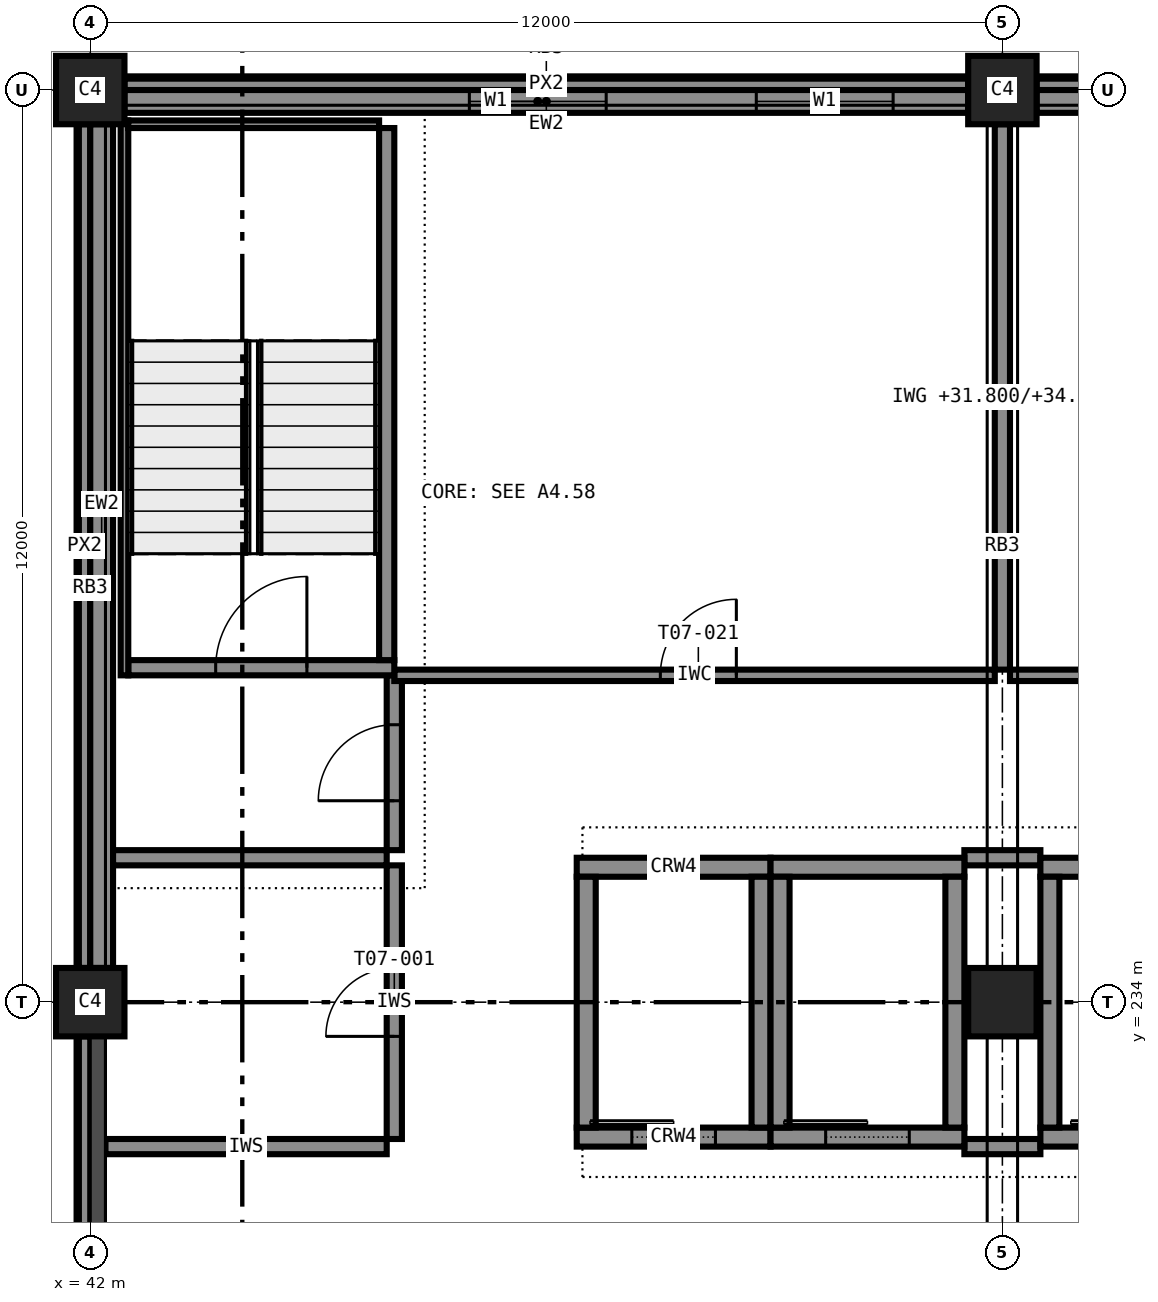
"""IFC4 building model, lengths in metres.
Left out: names, types, materials, properties, quantities, classifications, styles, units other than length and angle.
Written with IfcOpenShell. Run it as: python <this file> out.ifc"""

import sys

from ifc_helpers import new_model, si_unit, direction, frame, frame_2d, origin, origin_2d, place, context, subcontext, project, spatial, rectangle, extrude, element, fill, save


model = new_model("IFC4")
c1 = context("Model", 3, precision=1e-05, world=origin(), true_north=direction((0.0, 1.0)))
c2 = subcontext(c1, "Body", "Model", "MODEL_VIEW")
j1 = project(units=[si_unit("LENGTHUNIT", "METRE"), si_unit("PLANEANGLEUNIT", "RADIAN")], contexts=[c1])
p1 = place(None, origin())
s1 = spatial("IfcSite", under=j1, at=p1, CompositionType="ELEMENT")
p2 = place(p1, origin())
s2 = spatial("IfcBuilding", under=s1, at=p2, CompositionType="ELEMENT")
p3 = place(p2, frame((0.0, 0.0, 31.8)))
s3 = spatial("IfcBuildingStorey", under=s2, at=p3, CompositionType="ELEMENT", Elevation=31.8)
for number, where, z_axis, x_axis in (
    (1, (42.0, 234.0, 0.0), (0.0, 0.0, 1.0), (1.0, 0.0, 0.0)),
    (2, (42.0, 246.0, 0.0), (0.0, 0.0, 1.0), (1.0, 0.0, 0.0)),
    (3, (54.0, 234.0, 0.0), (0.0, 0.0, 1.0), (1.0, 0.0, 0.0)),
    (4, (54.0, 246.0, 0.0), (0.0, 0.0, 1.0), (1.0, 0.0, 0.0)),
):
    element("IfcColumn", number, at=place(p3, frame(where, z_axis=z_axis, x_axis=x_axis)), inside=s3, PredefinedType="COLUMN", context=c2, shape_type="SweptSolid", body=[
        extrude(rectangle(XDim=0.9, YDim=0.9, at=origin_2d()), origin(), (0.0, 0.0, 1.0), 3.6),
    ])
p4 = place(p3, frame((54.5, 232.225, 0.0), z_axis=(0.0, 0.0, 1.0), x_axis=(1.0, 0.0, 0.0)))
e5 = element("IfcWall", 5, at=p4, inside=s3, PredefinedType="SHEAR", context=c2, shape_type="SweptSolid", body=[
    extrude(rectangle(XDim=3.0, YDim=0.25, at=frame_2d((1.5, 0.0))), origin(), (0.0, 0.0, 1.0), 3.6),
])
p5 = place(p4, frame((0.95, 0.0, 0.0)))
e6 = element("IfcOpeningElement", 6, at=p5, cuts=e5, PredefinedType="OPENING", context=c2, shape_type="SweptSolid", body=[
    extrude(rectangle(XDim=1.1, YDim=2.1, at=frame_2d((0.55, 1.05))), frame((0.0, 0.135, 0.0), z_axis=(0.0, -1.0, 0.0), x_axis=(1.0, 0.0, 0.0)), (0.0, 0.0, 1.0), 0.27),
])
p6 = place(p3, frame((54.5, 235.775, 0.0), z_axis=(0.0, 0.0, 1.0), x_axis=(1.0, 0.0, 0.0)))
e7 = element("IfcWall", 7, at=p6, inside=s3, PredefinedType="SHEAR", context=c2, shape_type="SweptSolid", body=[
    extrude(rectangle(XDim=3.0, YDim=0.25, at=frame_2d((1.5, 0.0))), origin(), (0.0, 0.0, 1.0), 3.6),
])
p7 = place(p3, frame((54.625, 232.35, 0.0), z_axis=(0.0, 0.0, 1.0), x_axis=(0.0, 1.0, 0.0)))
e8 = element("IfcWall", 8, at=p7, inside=s3, PredefinedType="SHEAR", context=c2, shape_type="SweptSolid", body=[
    extrude(rectangle(XDim=3.3, YDim=0.25, at=frame_2d((1.65, 0.0))), origin(), (0.0, 0.0, 1.0), 3.6),
])
p8 = place(p3, frame((48.4, 232.225, 0.0), z_axis=(0.0, 0.0, 1.0), x_axis=(1.0, 0.0, 0.0)))
e9 = element("IfcWall", 9, at=p8, inside=s3, PredefinedType="SHEAR", context=c2, shape_type="SweptSolid", body=[
    extrude(rectangle(XDim=2.55, YDim=0.25, at=frame_2d((1.275, 0.0))), origin(), (0.0, 0.0, 1.0), 3.6),
])
p9 = place(p8, frame((0.725, 0.0, 0.0)))
e10 = element("IfcOpeningElement", 10, at=p9, cuts=e9, PredefinedType="OPENING", context=c2, shape_type="SweptSolid", body=[
    extrude(rectangle(XDim=1.1, YDim=2.1, at=frame_2d((0.55, 1.05))), frame((0.0, 0.135, 0.0), z_axis=(0.0, -1.0, 0.0), x_axis=(1.0, 0.0, 0.0)), (0.0, 0.0, 1.0), 0.27),
])
p10 = place(p3, frame((48.4, 235.775, 0.0), z_axis=(0.0, 0.0, 1.0), x_axis=(1.0, 0.0, 0.0)))
e11 = element("IfcWall", 11, at=p10, inside=s3, PredefinedType="SHEAR", context=c2, shape_type="SweptSolid", body=[
    extrude(rectangle(XDim=2.55, YDim=0.25, at=frame_2d((1.275, 0.0))), origin(), (0.0, 0.0, 1.0), 3.6),
])
for number, where, z_axis, x_axis in (
    (12, (48.525, 232.35, 0.0), (0.0, 0.0, 1.0), (0.0, 1.0, 0.0)),
    (13, (50.825, 232.35, 0.0), (0.0, 0.0, 1.0), (0.0, 1.0, 0.0)),
):
    element("IfcWall", number, at=place(p3, frame(where, z_axis=z_axis, x_axis=x_axis)), inside=s3, PredefinedType="SHEAR", context=c2, shape_type="SweptSolid", body=[
        extrude(rectangle(XDim=3.3, YDim=0.25, at=frame_2d((1.65, 0.0))), origin(), (0.0, 0.0, 1.0), 3.6),
    ])
p11 = place(p3, frame((50.95, 232.225, 0.0), z_axis=(0.0, 0.0, 1.0), x_axis=(1.0, 0.0, 0.0)))
e14 = element("IfcWall", 14, at=p11, inside=s3, PredefinedType="SHEAR", context=c2, shape_type="SweptSolid", body=[
    extrude(rectangle(XDim=2.55, YDim=0.25, at=frame_2d((1.275, 0.0))), origin(), (0.0, 0.0, 1.0), 3.6),
])
p12 = place(p11, frame((0.725, 0.0, 0.0)))
e15 = element("IfcOpeningElement", 15, at=p12, cuts=e14, PredefinedType="OPENING", context=c2, shape_type="SweptSolid", body=[
    extrude(rectangle(XDim=1.1, YDim=2.1, at=frame_2d((0.55, 1.05))), frame((0.0, 0.135, 0.0), z_axis=(0.0, -1.0, 0.0), x_axis=(1.0, 0.0, 0.0)), (0.0, 0.0, 1.0), 0.27),
])
p13 = place(p3, frame((50.95, 235.775, 0.0), z_axis=(0.0, 0.0, 1.0), x_axis=(1.0, 0.0, 0.0)))
e16 = element("IfcWall", 16, at=p13, inside=s3, PredefinedType="SHEAR", context=c2, shape_type="SweptSolid", body=[
    extrude(rectangle(XDim=2.55, YDim=0.25, at=frame_2d((1.275, 0.0))), origin(), (0.0, 0.0, 1.0), 3.6),
])
for number, where, z_axis, x_axis in (
    (17, (51.075, 232.35, 0.0), (0.0, 0.0, 1.0), (0.0, 1.0, 0.0)),
    (18, (53.375, 232.35, 0.0), (0.0, 0.0, 1.0), (0.0, 1.0, 0.0)),
):
    element("IfcWall", number, at=place(p3, frame(where, z_axis=z_axis, x_axis=x_axis)), inside=s3, PredefinedType="SHEAR", context=c2, shape_type="SweptSolid", body=[
        extrude(rectangle(XDim=3.3, YDim=0.25, at=frame_2d((1.65, 0.0))), origin(), (0.0, 0.0, 1.0), 3.6),
    ])
p14 = place(p3, frame((42.5, 238.4, 0.0), z_axis=(0.0, 0.0, 1.0), x_axis=(1.0, 0.0, 0.0)))
e19 = element("IfcWall", 19, at=p14, inside=s3, PredefinedType="SHEAR", context=c2, shape_type="SweptSolid", body=[
    extrude(rectangle(XDim=3.5, YDim=0.2, at=frame_2d((1.75, 0.0))), origin(), (0.0, 0.0, 1.0), 3.6),
])
p15 = place(p14, frame((1.15, 0.0, 0.0)))
e20 = element("IfcOpeningElement", 20, at=p15, cuts=e19, PredefinedType="OPENING", context=c2, shape_type="SweptSolid", body=[
    extrude(rectangle(XDim=1.2, YDim=2.1, at=frame_2d((0.6, 1.05))), frame((0.0, 0.11, 0.0), z_axis=(0.0, -1.0, 0.0), x_axis=(1.0, 0.0, 0.0)), (0.0, 0.0, 1.0), 0.22),
])
p16 = place(p3, frame((45.9, 238.5, 0.0), z_axis=(0.0, 0.0, 1.0), x_axis=(0.0, 1.0, 0.0)))
e21 = element("IfcWall", 21, at=p16, inside=s3, PredefinedType="SHEAR", context=c2, shape_type="SweptSolid", body=[
    extrude(rectangle(XDim=7.0, YDim=0.2, at=frame_2d((3.5, 0.0))), origin(), (0.0, 0.0, 1.0), 3.6),
])
p17 = place(p3, frame((42.45, 238.3, 0.0), z_axis=(0.0, 0.0, 1.0), x_axis=(0.0, 1.0, 0.0)))
e22 = element("IfcWall", 22, at=p17, inside=s3, PredefinedType="SHEAR", context=c2, shape_type="SweptSolid", body=[
    extrude(rectangle(XDim=7.3, YDim=0.1, at=frame_2d((3.65, 0.0))), origin(), (0.0, 0.0, 1.0), 3.4),
])
p18 = place(p3, frame((42.5, 245.55, 0.0), z_axis=(0.0, 0.0, 1.0), x_axis=(1.0, 0.0, 0.0)))
e23 = element("IfcWall", 23, at=p18, inside=s3, PredefinedType="SHEAR", context=c2, shape_type="SweptSolid", body=[
    extrude(rectangle(XDim=3.3, YDim=0.1, at=frame_2d((1.65, 0.0))), origin(), (0.0, 0.0, 1.0), 3.4),
])
p19 = place(p3, frame((65.55, 245.85, 0.0), z_axis=(0.0, 0.0, 1.0), x_axis=(-1.0, 0.0, 0.0)))
e24 = element("IfcWall", 24, at=p19, inside=s3, PredefinedType="STANDARD", context=c2, shape_type="SweptSolid", body=[
    extrude(rectangle(XDim=11.1, YDim=0.3, at=frame_2d((5.55, 0.0))), origin(), (0.0, 0.0, 1.0), 2.6),
])
p20 = place(p19, frame((7.425, 0.0, 0.85)))
e25 = element("IfcOpeningElement", 25, at=p20, cuts=e24, PredefinedType="OPENING", context=c2, shape_type="SweptSolid", body=[
    extrude(rectangle(XDim=1.8, YDim=1.75, at=frame_2d((0.9, 0.875))), frame((0.0, 0.16, 0.0), z_axis=(0.0, -1.0, 0.0), x_axis=(1.0, 0.0, 0.0)), (0.0, 0.0, 1.0), 0.32),
])
p21 = place(p19, frame((1.875, 0.0, 0.85)))
e26 = element("IfcOpeningElement", 26, at=p21, cuts=e24, PredefinedType="OPENING", context=c2, shape_type="SweptSolid", body=[
    extrude(rectangle(XDim=1.8, YDim=1.75, at=frame_2d((0.9, 0.875))), frame((0.0, 0.16, 0.0), z_axis=(0.0, -1.0, 0.0), x_axis=(1.0, 0.0, 0.0)), (0.0, 0.0, 1.0), 0.32),
])
p22 = place(p3, frame((53.55, 245.85, 0.0), z_axis=(0.0, 0.0, 1.0), x_axis=(-1.0, 0.0, 0.0)))
e27 = element("IfcWall", 27, at=p22, inside=s3, PredefinedType="STANDARD", context=c2, shape_type="SweptSolid", body=[
    extrude(rectangle(XDim=11.1, YDim=0.3, at=frame_2d((5.55, 0.0))), origin(), (0.0, 0.0, 1.0), 2.6),
])
p23 = place(p22, frame((0.988, 0.0, 0.85)))
e28 = element("IfcOpeningElement", 28, at=p23, cuts=e27, PredefinedType="OPENING", context=c2, shape_type="SweptSolid", body=[
    extrude(rectangle(XDim=1.8, YDim=1.75, at=frame_2d((0.9, 0.875))), frame((0.0, 0.16, 0.0), z_axis=(0.0, -1.0, 0.0), x_axis=(1.0, 0.0, 0.0)), (0.0, 0.0, 1.0), 0.32),
])
p24 = place(p22, frame((4.762, 0.0, 0.85)))
e29 = element("IfcOpeningElement", 29, at=p24, cuts=e27, PredefinedType="OPENING", context=c2, shape_type="SweptSolid", body=[
    extrude(rectangle(XDim=1.8, YDim=1.75, at=frame_2d((0.9, 0.875))), frame((0.0, 0.16, 0.0), z_axis=(0.0, -1.0, 0.0), x_axis=(1.0, 0.0, 0.0)), (0.0, 0.0, 1.0), 0.32),
])
for number, where, z_axis, x_axis in (
    (30, (65.55, 246.075, 3.4), (0.0, 0.0, 1.0), (-1.0, 0.0, 0.0)),
    (31, (53.55, 246.075, 3.4), (0.0, 0.0, 1.0), (-1.0, 0.0, 0.0)),
):
    element("IfcWall", number, at=place(p3, frame(where, z_axis=z_axis, x_axis=x_axis)), inside=s3, PredefinedType="STANDARD", context=c2, shape_type="SweptSolid", body=[
        extrude(rectangle(XDim=11.1, YDim=0.15, at=frame_2d((5.55, 0.0))), origin(), (0.0, 0.0, 1.0), 0.2),
    ])
p25 = place(p3, frame((42.15, 245.55, 0.0), z_axis=(0.0, 0.0, 1.0), x_axis=(0.0, -1.0, 0.0)))
e32 = element("IfcWall", 32, at=p25, inside=s3, PredefinedType="STANDARD", context=c2, shape_type="SweptSolid", body=[
    extrude(rectangle(XDim=11.1, YDim=0.3, at=frame_2d((5.55, 0.0))), origin(), (0.0, 0.0, 1.0), 2.6),
])
for number, where, z_axis, x_axis in (
    (33, (41.925, 245.55, 3.4), (0.0, 0.0, 1.0), (0.0, -1.0, 0.0)),
    (34, (41.925, 233.55, 3.4), (0.0, 0.0, 1.0), (0.0, -1.0, 0.0)),
):
    element("IfcWall", number, at=place(p3, frame(where, z_axis=z_axis, x_axis=x_axis)), inside=s3, PredefinedType="STANDARD", context=c2, shape_type="SweptSolid", body=[
        extrude(rectangle(XDim=11.1, YDim=0.15, at=frame_2d((5.55, 0.0))), origin(), (0.0, 0.0, 1.0), 0.2),
    ])
p26 = place(p3, frame((42.2, 232.1, 0.0), z_axis=(0.0, 0.0, 1.0), x_axis=(1.0, 0.0, 0.0)))
e35 = element("IfcWall", 35, at=p26, inside=s3, PredefinedType="PARTITIONING", context=c2, shape_type="SweptSolid", body=[
    extrude(rectangle(XDim=3.7, YDim=0.2, at=frame_2d((1.85, 0.0))), origin(), (0.0, 0.0, 1.0), 3.4),
])
p27 = place(p3, frame((53.5, 232.1, 0.0), z_axis=(0.0, 0.0, 1.0), x_axis=(1.0, 0.0, 0.0)))
e36 = element("IfcWall", 36, at=p27, inside=s3, PredefinedType="PARTITIONING", context=c2, shape_type="SweptSolid", body=[
    extrude(rectangle(XDim=1.0, YDim=0.2, at=frame_2d((0.5, 0.0))), origin(), (0.0, 0.0, 1.0), 3.4),
])
p28 = place(p3, frame((42.3, 235.9, 0.0), z_axis=(0.0, 0.0, 1.0), x_axis=(1.0, 0.0, 0.0)))
e37 = element("IfcWall", 37, at=p28, inside=s3, PredefinedType="PARTITIONING", context=c2, shape_type="SweptSolid", body=[
    extrude(rectangle(XDim=3.6, YDim=0.2, at=frame_2d((1.8, 0.0))), origin(), (0.0, 0.0, 1.0), 3.4),
])
p29 = place(p3, frame((53.5, 235.9, 0.0), z_axis=(0.0, 0.0, 1.0), x_axis=(1.0, 0.0, 0.0)))
e38 = element("IfcWall", 38, at=p29, inside=s3, PredefinedType="PARTITIONING", context=c2, shape_type="SweptSolid", body=[
    extrude(rectangle(XDim=1.0, YDim=0.2, at=frame_2d((0.5, 0.0))), origin(), (0.0, 0.0, 1.0), 3.4),
])
p30 = place(p3, frame((46.0, 232.2, 0.0), z_axis=(0.0, 0.0, 1.0), x_axis=(0.0, 1.0, 0.0)))
e39 = element("IfcWall", 39, at=p30, inside=s3, PredefinedType="PARTITIONING", context=c2, shape_type="SweptSolid", body=[
    extrude(rectangle(XDim=3.6, YDim=0.2, at=frame_2d((1.8, 0.0))), origin(), (0.0, 0.0, 1.0), 3.4),
])
p31 = place(p30, frame((1.35, 0.0, 0.0)))
e40 = element("IfcOpeningElement", 40, at=p31, cuts=e39, PredefinedType="OPENING", context=c2, shape_type="SweptSolid", body=[
    extrude(rectangle(XDim=0.9, YDim=2.1, at=frame_2d((0.45, 1.05))), frame((0.0, 0.11, 0.0), z_axis=(0.0, -1.0, 0.0), x_axis=(1.0, 0.0, 0.0)), (0.0, 0.0, 1.0), 0.22),
])
p32 = place(p3, frame((46.0, 236.0, 0.0), z_axis=(0.0, 0.0, 1.0), x_axis=(0.0, 1.0, 0.0)))
e41 = element("IfcWall", 41, at=p32, inside=s3, PredefinedType="PARTITIONING", context=c2, shape_type="SweptSolid", body=[
    extrude(rectangle(XDim=2.3, YDim=0.2, at=frame_2d((1.15, 0.0))), origin(), (0.0, 0.0, 1.0), 3.4),
])
p33 = place(p32, frame((0.65, 0.0, 0.0)))
e42 = element("IfcOpeningElement", 42, at=p33, cuts=e41, PredefinedType="OPENING", context=c2, shape_type="SweptSolid", body=[
    extrude(rectangle(XDim=1.0, YDim=2.1, at=frame_2d((0.5, 1.05))), frame((0.0, 0.11, 0.0), z_axis=(0.0, -1.0, 0.0), x_axis=(1.0, 0.0, 0.0)), (0.0, 0.0, 1.0), 0.22),
])
p34 = place(p3, frame((46.0, 238.3, 0.0), z_axis=(0.0, 0.0, 1.0), x_axis=(1.0, 0.0, 0.0)))
e43 = element("IfcWall", 43, at=p34, inside=s3, PredefinedType="PARTITIONING", context=c2, shape_type="SweptSolid", body=[
    extrude(rectangle(XDim=7.9, YDim=0.15, at=frame_2d((3.95, 0.0))), origin(), (0.0, 0.0, 1.0), 3.4),
])
p35 = place(p34, frame((3.5, 0.0, 0.0)))
e44 = element("IfcOpeningElement", 44, at=p35, cuts=e43, PredefinedType="OPENING", context=c2, shape_type="SweptSolid", body=[
    extrude(rectangle(XDim=1.0, YDim=2.1, at=frame_2d((0.5, 1.05))), frame((0.0, 0.085, 0.0), z_axis=(0.0, -1.0, 0.0), x_axis=(1.0, 0.0, 0.0)), (0.0, 0.0, 1.0), 0.17),
])
p36 = place(p3, frame((54.1, 238.3, 0.0), z_axis=(0.0, 0.0, 1.0), x_axis=(1.0, 0.0, 0.0)))
e45 = element("IfcWall", 45, at=p36, inside=s3, PredefinedType="PARTITIONING", context=c2, shape_type="SweptSolid", body=[
    extrude(rectangle(XDim=5.8, YDim=0.15, at=frame_2d((2.9, 0.0))), origin(), (0.0, 0.0, 1.0), 3.4),
])
p37 = place(p36, frame((2.4, 0.0, 0.0)))
e46 = element("IfcOpeningElement", 46, at=p37, cuts=e45, PredefinedType="OPENING", context=c2, shape_type="SweptSolid", body=[
    extrude(rectangle(XDim=1.0, YDim=2.1, at=frame_2d((0.5, 1.05))), frame((0.0, 0.085, 0.0), z_axis=(0.0, -1.0, 0.0), x_axis=(1.0, 0.0, 0.0)), (0.0, 0.0, 1.0), 0.17),
])
p38 = place(p3, frame((54.0, 245.55, 0.0), z_axis=(0.0, 0.0, 1.0), x_axis=(0.0, -1.0, 0.0)))
e47 = element("IfcWall", 47, at=p38, inside=s3, PredefinedType="PARTITIONING", context=c2, shape_type="SweptSolid", body=[
    extrude(rectangle(XDim=7.175, YDim=0.2, at=frame_2d((3.587, 0.0))), origin(), (0.0, 0.0, 1.0), 2.6),
])
p39 = place(p23, origin())
e48 = element("IfcWindow", 48, at=p39, inside=s3, PartitioningType="SINGLE_PANEL", PredefinedType="WINDOW", context=c2, shape_type="SweptSolid", body=[
    extrude(rectangle(XDim=1.8, YDim=1.75, at=frame_2d((0.9, 0.875))), frame((0.0, 0.03, 0.0), z_axis=(0.0, -1.0, 0.0), x_axis=(1.0, 0.0, 0.0)), (0.0, 0.0, 1.0), 0.06),
])
fill(e28, e48)
p40 = place(p24, origin())
e49 = element("IfcWindow", 49, at=p40, inside=s3, PartitioningType="SINGLE_PANEL", PredefinedType="WINDOW", context=c2, shape_type="SweptSolid", body=[
    extrude(rectangle(XDim=1.8, YDim=1.75, at=frame_2d((0.9, 0.875))), frame((0.0, 0.03, 0.0), z_axis=(0.0, -1.0, 0.0), x_axis=(1.0, 0.0, 0.0)), (0.0, 0.0, 1.0), 0.06),
])
fill(e29, e49)
p41 = place(p31, origin())
e50 = element("IfcDoor", 50, at=p41, inside=s3, OperationType="SINGLE_SWING_LEFT", PredefinedType="DOOR", context=c2, shape_type="SweptSolid", body=[
    extrude(rectangle(XDim=0.9, YDim=2.1, at=frame_2d((0.45, 1.05))), frame((0.0, 0.025, 0.0), z_axis=(0.0, -1.0, 0.0), x_axis=(1.0, 0.0, 0.0)), (0.0, 0.0, 1.0), 0.05),
])
fill(e40, e50)
p42 = place(p33, origin())
e51 = element("IfcDoor", 51, at=p42, inside=s3, OperationType="SINGLE_SWING_LEFT", PredefinedType="DOOR", context=c2, shape_type="SweptSolid", body=[
    extrude(rectangle(XDim=1.0, YDim=2.1, at=frame_2d((0.5, 1.05))), frame((0.0, 0.025, 0.0), z_axis=(0.0, -1.0, 0.0), x_axis=(1.0, 0.0, 0.0)), (0.0, 0.0, 1.0), 0.05),
])
fill(e42, e51)
p43 = place(p35, origin())
e52 = element("IfcDoor", 52, at=p43, inside=s3, OperationType="SINGLE_SWING_RIGHT", PredefinedType="DOOR", context=c2, shape_type="SweptSolid", body=[
    extrude(rectangle(XDim=1.0, YDim=2.1, at=frame_2d((0.5, 1.05))), frame((0.0, 0.025, 0.0), z_axis=(0.0, -1.0, 0.0), x_axis=(1.0, 0.0, 0.0)), (0.0, 0.0, 1.0), 0.05),
])
fill(e44, e52)
p44 = place(p9, origin())
e53 = element("IfcDoor", 53, at=p44, inside=s3, OperationType="SLIDING_TO_LEFT", PredefinedType="DOOR", context=c2, shape_type="SweptSolid", body=[
    extrude(rectangle(XDim=1.1, YDim=2.1, at=frame_2d((0.55, 1.05))), frame((0.0, 0.025, 0.0), z_axis=(0.0, -1.0, 0.0), x_axis=(1.0, 0.0, 0.0)), (0.0, 0.0, 1.0), 0.05),
])
fill(e10, e53)
p45 = place(p12, origin())
e54 = element("IfcDoor", 54, at=p45, inside=s3, OperationType="SLIDING_TO_LEFT", PredefinedType="DOOR", context=c2, shape_type="SweptSolid", body=[
    extrude(rectangle(XDim=1.1, YDim=2.1, at=frame_2d((0.55, 1.05))), frame((0.0, 0.025, 0.0), z_axis=(0.0, -1.0, 0.0), x_axis=(1.0, 0.0, 0.0)), (0.0, 0.0, 1.0), 0.05),
])
fill(e15, e54)
p46 = place(p15, origin())
e55 = element("IfcDoor", 55, at=p46, inside=s3, OperationType="SINGLE_SWING_RIGHT", PredefinedType="DOOR", context=c2, shape_type="SweptSolid", body=[
    extrude(rectangle(XDim=1.2, YDim=2.1, at=frame_2d((0.6, 1.05))), frame((0.0, 0.025, 0.0), z_axis=(0.0, -1.0, 0.0), x_axis=(1.0, 0.0, 0.0)), (0.0, 0.0, 1.0), 0.05),
])
fill(e20, e55)
save(model, sys.argv[1])
